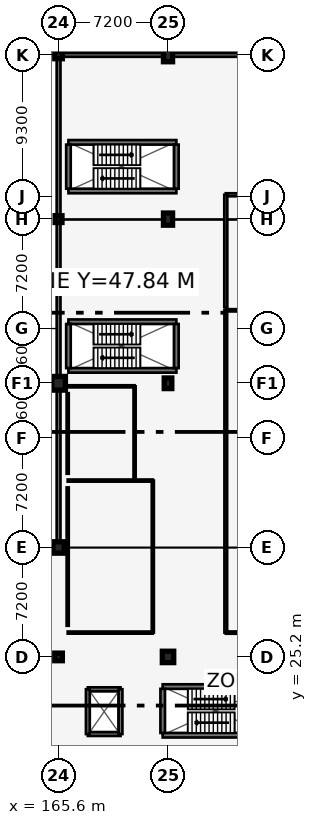
"""IFC4 building model, lengths in metres.
Left out: names, types, materials, properties, quantities, classifications, styles, units other than length and angle.
Written with IfcOpenShell. Run it as: python <this file> out.ifc"""

import sys

from ifc_helpers import new_model, si_unit, direction, frame, frame_2d, origin, origin_2d, place, context, subcontext, project, spatial, rectangle, circle, extrude, element, fill, save


model = new_model("IFC4")
c1 = context("Model", 3, precision=1e-05, world=origin(), true_north=direction((0.0, 1.0)))
c2 = subcontext(c1, "Body", "Model", "MODEL_VIEW")
j1 = project(units=[si_unit("LENGTHUNIT", "METRE"), si_unit("PLANEANGLEUNIT", "RADIAN")], contexts=[c1])
p1 = place(None, origin())
s1 = spatial("IfcSite", under=j1, at=p1, CompositionType="ELEMENT")
p2 = place(p1, origin())
s2 = spatial("IfcBuilding", under=s1, at=p2, CompositionType="ELEMENT")
p3 = place(p2, frame((0.0, 0.0, 13.2)))
s3 = spatial("IfcBuildingStorey", under=s2, at=p3, CompositionType="ELEMENT", Elevation=13.2)
p4 = place(p3, frame((165.6, 25.2, 0.0), z_axis=(0.0, 0.0, 1.0), x_axis=(1.0, 0.0, 0.0)))
e1 = element("IfcColumn", 1, at=p4, inside=s3, PredefinedType="COLUMN", context=c2, shape_type="SweptSolid", body=[
    extrude(circle(Radius=0.25, at=origin_2d()), origin(), (0.0, 0.0, 1.0), 4.2),
])
p5 = place(p3, frame((165.6, 32.4, 0.0), z_axis=(0.0, 0.0, 1.0), x_axis=(1.0, 0.0, 0.0)))
e2 = element("IfcColumn", 2, at=p5, inside=s3, PredefinedType="COLUMN", context=c2, shape_type="SweptSolid", body=[
    extrude(circle(Radius=0.375, at=origin_2d()), origin(), (0.0, 0.0, 1.0), 4.2),
])
p6 = place(p3, frame((165.6, 43.2, 0.0), z_axis=(0.0, 0.0, 1.0), x_axis=(1.0, 0.0, 0.0)))
e3 = element("IfcColumn", 3, at=p6, inside=s3, PredefinedType="COLUMN", context=c2, shape_type="SweptSolid", body=[
    extrude(circle(Radius=0.45, at=origin_2d()), origin(), (0.0, 0.0, 1.0), 4.2),
])
p7 = place(p3, frame((165.6, 54.0, 0.0), z_axis=(0.0, 0.0, 1.0), x_axis=(1.0, 0.0, 0.0)))
e4 = element("IfcColumn", 4, at=p7, inside=s3, PredefinedType="COLUMN", context=c2, shape_type="SweptSolid", body=[
    extrude(rectangle(XDim=0.45, YDim=0.45, at=origin_2d()), origin(), (0.0, 0.0, 1.0), 4.2),
])
p8 = place(p3, frame((165.6, 64.8, 0.0), z_axis=(0.0, 0.0, 1.0), x_axis=(1.0, 0.0, 0.0)))
e5 = element("IfcColumn", 5, at=p8, inside=s3, PredefinedType="COLUMN", context=c2, shape_type="SweptSolid", body=[
    extrude(rectangle(XDim=0.5, YDim=0.5, at=origin_2d()), origin(), (0.0, 0.0, 1.0), 4.2),
])
p9 = place(p3, frame((172.8, 25.2, 0.0), z_axis=(0.0, 0.0, 1.0), x_axis=(1.0, 0.0, 0.0)))
e6 = element("IfcColumn", 6, at=p9, inside=s3, PredefinedType="COLUMN", context=c2, shape_type="SweptSolid", body=[
    extrude(rectangle(XDim=0.75, YDim=0.75, at=origin_2d()), origin(), (0.0, 0.0, 1.0), 4.2),
])
p10 = place(p3, frame((172.8, 43.2, 0.0), z_axis=(0.0, 0.0, 1.0), x_axis=(1.0, 0.0, 0.0)))
e7 = element("IfcColumn", 7, at=p10, inside=s3, PredefinedType="COLUMN", context=c2, shape_type="SweptSolid", body=[
    extrude(rectangle(XDim=0.5, YDim=0.7, at=origin_2d()), origin(), (0.0, 0.0, 1.0), 4.2),
])
p11 = place(p3, frame((172.8, 54.0, 0.0), z_axis=(0.0, 0.0, 1.0), x_axis=(1.0, 0.0, 0.0)))
e8 = element("IfcColumn", 8, at=p11, inside=s3, PredefinedType="COLUMN", context=c2, shape_type="SweptSolid", body=[
    extrude(rectangle(XDim=0.6, YDim=0.8, at=origin_2d()), origin(), (0.0, 0.0, 1.0), 4.2),
])
p12 = place(p3, frame((172.8, 64.8, 0.0), z_axis=(0.0, 0.0, 1.0), x_axis=(1.0, 0.0, 0.0)))
e9 = element("IfcColumn", 9, at=p12, inside=s3, PredefinedType="COLUMN", context=c2, shape_type="SweptSolid", body=[
    extrude(rectangle(XDim=0.6, YDim=0.9, at=origin_2d()), origin(), (0.0, 0.0, 1.0), 4.2),
])
p13 = place(p3, frame((165.6, 32.4, 0.0), z_axis=(0.0, 0.0, 1.0), x_axis=(-1.0, 0.0, 0.0)))
e10 = element("IfcWall", 10, at=p13, inside=s3, PredefinedType="SOLIDWALL", context=c2, shape_type="SweptSolid", body=[
    extrude(rectangle(XDim=50.4, YDim=0.25, at=frame_2d((25.2, 0.0))), origin(), (0.0, 0.0, 1.0), 3.35),
])
p14 = place(p13, frame((2.2, 0.0, 0.78)))
e11 = element("IfcOpeningElement", 11, at=p14, cuts=e10, PredefinedType="OPENING", context=c2, shape_type="SweptSolid", body=[
    extrude(rectangle(XDim=1.35, YDim=1.75, at=frame_2d((0.675, 0.875))), frame((0.0, 0.135, 0.0), z_axis=(0.0, -1.0, 0.0), x_axis=(1.0, 0.0, 0.0)), (0.0, 0.0, 1.0), 0.27),
])
p15 = place(p13, frame((9.4, 0.0, 0.78)))
e12 = element("IfcOpeningElement", 12, at=p15, cuts=e10, PredefinedType="OPENING", context=c2, shape_type="SweptSolid", body=[
    extrude(rectangle(XDim=1.5, YDim=1.75, at=frame_2d((0.75, 0.875))), frame((0.0, 0.135, 0.0), z_axis=(0.0, -1.0, 0.0), x_axis=(1.0, 0.0, 0.0)), (0.0, 0.0, 1.0), 0.27),
])
p16 = place(p13, frame((16.6, 0.0, 0.78)))
e13 = element("IfcOpeningElement", 13, at=p16, cuts=e10, PredefinedType="OPENING", context=c2, shape_type="SweptSolid", body=[
    extrude(rectangle(XDim=1.65, YDim=1.8, at=frame_2d((0.825, 0.9))), frame((0.0, 0.135, 0.0), z_axis=(0.0, -1.0, 0.0), x_axis=(1.0, 0.0, 0.0)), (0.0, 0.0, 1.0), 0.27),
])
p17 = place(p13, frame((23.8, 0.0, 0.78)))
e14 = element("IfcOpeningElement", 14, at=p17, cuts=e10, PredefinedType="OPENING", context=c2, shape_type="SweptSolid", body=[
    extrude(rectangle(XDim=1.95, YDim=1.8, at=frame_2d((0.975, 0.9))), frame((0.0, 0.135, 0.0), z_axis=(0.0, -1.0, 0.0), x_axis=(1.0, 0.0, 0.0)), (0.0, 0.0, 1.0), 0.27),
])
p18 = place(p13, frame((31.0, 0.0, 0.78)))
e15 = element("IfcOpeningElement", 15, at=p18, cuts=e10, PredefinedType="OPENING", context=c2, shape_type="SweptSolid", body=[
    extrude(rectangle(XDim=2.1, YDim=1.8, at=frame_2d((1.05, 0.9))), frame((0.0, 0.135, 0.0), z_axis=(0.0, -1.0, 0.0), x_axis=(1.0, 0.0, 0.0)), (0.0, 0.0, 1.0), 0.27),
])
p19 = place(p13, frame((38.2, 0.0, 0.78)))
e16 = element("IfcOpeningElement", 16, at=p19, cuts=e10, PredefinedType="OPENING", context=c2, shape_type="SweptSolid", body=[
    extrude(rectangle(XDim=1.1, YDim=1.65, at=frame_2d((0.55, 0.825))), frame((0.0, 0.135, 0.0), z_axis=(0.0, -1.0, 0.0), x_axis=(1.0, 0.0, 0.0)), (0.0, 0.0, 1.0), 0.27),
])
p20 = place(p3, frame((187.2, 64.8, 0.0), z_axis=(0.0, 0.0, 1.0), x_axis=(-1.0, 0.0, 0.0)))
e17 = element("IfcWall", 17, at=p20, inside=s3, PredefinedType="SOLIDWALL", context=c2, shape_type="SweptSolid", body=[
    extrude(rectangle(XDim=21.6, YDim=0.25, at=frame_2d((10.8, 0.0))), origin(), (0.0, 0.0, 1.0), 3.35),
])
p21 = place(p20, frame((2.2, 0.0, 0.78)))
e18 = element("IfcOpeningElement", 18, at=p21, cuts=e17, PredefinedType="OPENING", context=c2, shape_type="SweptSolid", body=[
    extrude(rectangle(XDim=1.65, YDim=1.8, at=frame_2d((0.825, 0.9))), frame((0.0, 0.135, 0.0), z_axis=(0.0, -1.0, 0.0), x_axis=(1.0, 0.0, 0.0)), (0.0, 0.0, 1.0), 0.27),
])
p22 = place(p20, frame((9.4, 0.0, 0.78)))
e19 = element("IfcOpeningElement", 19, at=p22, cuts=e17, PredefinedType="OPENING", context=c2, shape_type="SweptSolid", body=[
    extrude(rectangle(XDim=1.95, YDim=1.8, at=frame_2d((0.975, 0.9))), frame((0.0, 0.135, 0.0), z_axis=(0.0, -1.0, 0.0), x_axis=(1.0, 0.0, 0.0)), (0.0, 0.0, 1.0), 0.27),
])
p23 = place(p3, frame((165.6, 64.8, 0.0), z_axis=(0.0, 0.0, 1.0), x_axis=(0.0, -1.0, 0.0)))
e20 = element("IfcWall", 20, at=p23, inside=s3, PredefinedType="SOLIDWALL", context=c2, shape_type="SweptSolid", body=[
    extrude(rectangle(XDim=32.4, YDim=0.25, at=frame_2d((16.2, 0.0))), origin(), (0.0, 0.0, 1.0), 3.35),
])
p24 = place(p23, frame((2.2, 0.0, 0.78)))
e21 = element("IfcOpeningElement", 21, at=p24, cuts=e20, PredefinedType="OPENING", context=c2, shape_type="SweptSolid", body=[
    extrude(rectangle(XDim=1.95, YDim=1.8, at=frame_2d((0.975, 0.9))), frame((0.0, 0.135, 0.0), z_axis=(0.0, -1.0, 0.0), x_axis=(1.0, 0.0, 0.0)), (0.0, 0.0, 1.0), 0.27),
])
p25 = place(p23, frame((16.6, 0.0, 0.78)))
e22 = element("IfcOpeningElement", 22, at=p25, cuts=e20, PredefinedType="OPENING", context=c2, shape_type="SweptSolid", body=[
    extrude(rectangle(XDim=1.1, YDim=1.65, at=frame_2d((0.55, 0.825))), frame((0.0, 0.135, 0.0), z_axis=(0.0, -1.0, 0.0), x_axis=(1.0, 0.0, 0.0)), (0.0, 0.0, 1.0), 0.27),
])
p26 = place(p3, frame((172.45, 20.05, 0.0), z_axis=(0.0, 0.0, 1.0), x_axis=(1.0, 0.0, 0.0)))
e23 = element("IfcWall", 23, at=p26, inside=s3, PredefinedType="SHEAR", context=c2, shape_type="SweptSolid", body=[
    extrude(rectangle(XDim=7.1, YDim=0.3, at=frame_2d((3.55, 0.0))), origin(), (0.0, 0.0, 1.0), 3.45),
])
p27 = place(p26, frame((0.35, 0.0, 0.0)))
e24 = element("IfcOpeningElement", 24, at=p27, cuts=e23, PredefinedType="OPENING", context=c2, shape_type="SweptSolid", body=[
    extrude(rectangle(XDim=1.07, YDim=2.15, at=frame_2d((0.535, 1.075))), frame((0.0, 0.16, 0.0), z_axis=(0.0, -1.0, 0.0), x_axis=(1.0, 0.0, 0.0)), (0.0, 0.0, 1.0), 0.32),
])
p28 = place(p3, frame((179.55, 23.25, 0.0), z_axis=(0.0, 0.0, 1.0), x_axis=(-1.0, 0.0, 0.0)))
e25 = element("IfcWall", 25, at=p28, inside=s3, PredefinedType="SHEAR", context=c2, shape_type="SweptSolid", body=[
    extrude(rectangle(XDim=7.1, YDim=0.3, at=frame_2d((3.55, 0.0))), origin(), (0.0, 0.0, 1.0), 3.45),
])
p29 = place(p3, frame((172.45, 23.1, 0.0), z_axis=(0.0, 0.0, 1.0), x_axis=(0.0, -1.0, 0.0)))
e26 = element("IfcWall", 26, at=p29, inside=s3, PredefinedType="SHEAR", context=c2, shape_type="SweptSolid", body=[
    extrude(rectangle(XDim=2.9, YDim=0.3, at=frame_2d((1.45, 0.0))), origin(), (0.0, 0.0, 1.0), 3.45),
])
for number, where, z_axis, x_axis in (
    (27, (166.25, 44.05, 0.0), (0.0, 0.0, 1.0), (1.0, 0.0, 0.0)),
    (28, (173.35, 47.25, 0.0), (0.0, 0.0, 1.0), (-1.0, 0.0, 0.0)),
):
    element("IfcWall", number, at=place(p3, frame(where, z_axis=z_axis, x_axis=x_axis)), inside=s3, PredefinedType="SHEAR", context=c2, shape_type="SweptSolid", body=[
        extrude(rectangle(XDim=7.1, YDim=0.3, at=frame_2d((3.55, 0.0))), origin(), (0.0, 0.0, 1.0), 3.45),
    ])
p30 = place(p3, frame((173.35, 44.2, 0.0), z_axis=(0.0, 0.0, 1.0), x_axis=(0.0, 1.0, 0.0)))
e29 = element("IfcWall", 29, at=p30, inside=s3, PredefinedType="SHEAR", context=c2, shape_type="SweptSolid", body=[
    extrude(rectangle(XDim=2.9, YDim=0.3, at=frame_2d((1.45, 0.0))), origin(), (0.0, 0.0, 1.0), 3.45),
])
p31 = place(p3, frame((166.25, 47.1, 0.0), z_axis=(0.0, 0.0, 1.0), x_axis=(0.0, -1.0, 0.0)))
e30 = element("IfcWall", 30, at=p31, inside=s3, PredefinedType="SHEAR", context=c2, shape_type="SweptSolid", body=[
    extrude(rectangle(XDim=2.9, YDim=0.3, at=frame_2d((1.45, 0.0))), origin(), (0.0, 0.0, 1.0), 3.45),
])
p32 = place(p31, frame((0.75, 0.0, 0.0)))
e31 = element("IfcOpeningElement", 31, at=p32, cuts=e30, PredefinedType="OPENING", context=c2, shape_type="SweptSolid", body=[
    extrude(rectangle(XDim=1.07, YDim=2.15, at=frame_2d((0.535, 1.075))), frame((0.0, 0.16, 0.0), z_axis=(0.0, -1.0, 0.0), x_axis=(1.0, 0.0, 0.0)), (0.0, 0.0, 1.0), 0.32),
])
for number, where, z_axis, x_axis in (
    (32, (166.25, 55.85, 0.0), (0.0, 0.0, 1.0), (1.0, 0.0, 0.0)),
    (33, (173.35, 59.05, 0.0), (0.0, 0.0, 1.0), (-1.0, 0.0, 0.0)),
):
    element("IfcWall", number, at=place(p3, frame(where, z_axis=z_axis, x_axis=x_axis)), inside=s3, PredefinedType="SHEAR", context=c2, shape_type="SweptSolid", body=[
        extrude(rectangle(XDim=7.1, YDim=0.3, at=frame_2d((3.55, 0.0))), origin(), (0.0, 0.0, 1.0), 3.45),
    ])
p33 = place(p3, frame((173.35, 56.0, 0.0), z_axis=(0.0, 0.0, 1.0), x_axis=(0.0, 1.0, 0.0)))
e34 = element("IfcWall", 34, at=p33, inside=s3, PredefinedType="SHEAR", context=c2, shape_type="SweptSolid", body=[
    extrude(rectangle(XDim=2.9, YDim=0.3, at=frame_2d((1.45, 0.0))), origin(), (0.0, 0.0, 1.0), 3.45),
])
p34 = place(p3, frame((166.25, 58.9, 0.0), z_axis=(0.0, 0.0, 1.0), x_axis=(0.0, -1.0, 0.0)))
e35 = element("IfcWall", 35, at=p34, inside=s3, PredefinedType="SHEAR", context=c2, shape_type="SweptSolid", body=[
    extrude(rectangle(XDim=2.9, YDim=0.3, at=frame_2d((1.45, 0.0))), origin(), (0.0, 0.0, 1.0), 3.45),
])
p35 = place(p34, frame((0.75, 0.0, 0.0)))
e36 = element("IfcOpeningElement", 36, at=p35, cuts=e35, PredefinedType="OPENING", context=c2, shape_type="SweptSolid", body=[
    extrude(rectangle(XDim=1.07, YDim=2.15, at=frame_2d((0.535, 1.075))), frame((0.0, 0.16, 0.0), z_axis=(0.0, -1.0, 0.0), x_axis=(1.0, 0.0, 0.0)), (0.0, 0.0, 1.0), 0.32),
])
p36 = place(p3, frame((167.525, 20.125, 0.0), z_axis=(0.0, 0.0, 1.0), x_axis=(1.0, 0.0, 0.0)))
e37 = element("IfcWall", 37, at=p36, inside=s3, PredefinedType="SHEAR", context=c2, shape_type="SweptSolid", body=[
    extrude(rectangle(XDim=2.15, YDim=0.25, at=frame_2d((1.075, 0.0))), origin(), (0.0, 0.0, 1.0), 3.55),
])
p37 = place(p3, frame((169.675, 23.075, 0.0), z_axis=(0.0, 0.0, 1.0), x_axis=(-1.0, 0.0, 0.0)))
e38 = element("IfcWall", 38, at=p37, inside=s3, PredefinedType="SHEAR", context=c2, shape_type="SweptSolid", body=[
    extrude(rectangle(XDim=2.15, YDim=0.25, at=frame_2d((1.075, 0.0))), origin(), (0.0, 0.0, 1.0), 3.55),
])
p38 = place(p37, frame((0.525, 0.0, 0.0)))
e39 = element("IfcOpeningElement", 39, at=p38, cuts=e38, PredefinedType="OPENING", context=c2, shape_type="SweptSolid", body=[
    extrude(rectangle(XDim=1.1, YDim=2.15, at=frame_2d((0.55, 1.075))), frame((0.0, 0.135, 0.0), z_axis=(0.0, -1.0, 0.0), x_axis=(1.0, 0.0, 0.0)), (0.0, 0.0, 1.0), 0.27),
])
for number, where, z_axis, x_axis in (
    (40, (167.525, 23.075, 0.0), (0.0, 0.0, 1.0), (0.0, -1.0, 0.0)),
    (41, (169.675, 20.125, 0.0), (0.0, 0.0, 1.0), (0.0, 1.0, 0.0)),
):
    element("IfcWall", number, at=place(p3, frame(where, z_axis=z_axis, x_axis=x_axis)), inside=s3, PredefinedType="SHEAR", context=c2, shape_type="SweptSolid", body=[
        extrude(rectangle(XDim=2.95, YDim=0.25, at=frame_2d((1.475, 0.0))), origin(), (0.0, 0.0, 1.0), 3.55),
    ])
p39 = place(p3, frame((176.6, 48.0, 0.0), z_axis=(0.0, 0.0, 1.0), x_axis=(1.0, 0.0, 0.0)))
e42 = element("IfcWall", 42, at=p39, inside=s3, PredefinedType="PARTITIONING", context=c2, shape_type="SweptSolid", body=[
    extrude(rectangle(XDim=9.8, YDim=0.15, at=frame_2d((4.9, 0.0))), origin(), (0.0, 0.0, 1.0), 3.6),
])
p40 = place(p3, frame((186.4, 26.8, 0.0), z_axis=(0.0, 0.0, 1.0), x_axis=(-1.0, 0.0, 0.0)))
e43 = element("IfcWall", 43, at=p40, inside=s3, PredefinedType="PARTITIONING", context=c2, shape_type="SweptSolid", body=[
    extrude(rectangle(XDim=9.8, YDim=0.15, at=frame_2d((4.9, 0.0))), origin(), (0.0, 0.0, 1.0), 3.38),
])
p41 = place(p3, frame((176.6, 48.0, 0.0), z_axis=(0.0, 0.0, 1.0), x_axis=(0.0, -1.0, 0.0)))
e44 = element("IfcWall", 44, at=p41, inside=s3, PredefinedType="SOLIDWALL", context=c2, shape_type="SweptSolid", body=[
    extrude(rectangle(XDim=21.2, YDim=0.18, at=frame_2d((10.6, 0.0))), origin(), (0.0, 0.0, 1.0), 3.175),
])
p42 = place(p41, frame((10.1, 0.0, 0.0)))
e45 = element("IfcOpeningElement", 45, at=p42, cuts=e44, PredefinedType="OPENING", context=c2, shape_type="SweptSolid", body=[
    extrude(rectangle(XDim=1.0, YDim=2.15, at=frame_2d((0.5, 1.075))), frame((0.0, 0.1, 0.0), z_axis=(0.0, -1.0, 0.0), x_axis=(1.0, 0.0, 0.0)), (0.0, 0.0, 1.0), 0.2),
])
p43 = place(p3, frame((176.6, 55.6, 0.0), z_axis=(0.0, 0.0, 1.0), x_axis=(1.0, 0.0, 0.0)))
e46 = element("IfcWall", 46, at=p43, inside=s3, PredefinedType="SOLIDWALL", context=c2, shape_type="SweptSolid", body=[
    extrude(rectangle(XDim=9.8, YDim=0.2, at=frame_2d((4.9, 0.0))), origin(), (0.0, 0.0, 1.0), 3.6),
])
p44 = place(p3, frame((176.6, 55.6, 0.0), z_axis=(0.0, 0.0, 1.0), x_axis=(0.0, -1.0, 0.0)))
e47 = element("IfcWall", 47, at=p44, inside=s3, PredefinedType="SOLIDWALL", context=c2, shape_type="SweptSolid", body=[
    extrude(rectangle(XDim=7.4, YDim=0.2, at=frame_2d((3.7, 0.0))), origin(), (0.0, 0.0, 1.0), 3.482),
])
p45 = place(p44, frame((2.8, 0.0, 0.0)))
e48 = element("IfcOpeningElement", 48, at=p45, cuts=e47, PredefinedType="OPENING", context=c2, shape_type="SweptSolid", body=[
    extrude(rectangle(XDim=1.8, YDim=2.2, at=frame_2d((0.9, 1.1))), frame((0.0, 0.11, 0.0), z_axis=(0.0, -1.0, 0.0), x_axis=(1.0, 0.0, 0.0)), (0.0, 0.0, 1.0), 0.22),
])
for number, where, z_axis, x_axis in (
    (49, (166.2, 36.8, 0.0), (0.0, 0.0, 1.0), (1.0, 0.0, 0.0)),
    (50, (171.8, 26.8, 0.0), (0.0, 0.0, 1.0), (-1.0, 0.0, 0.0)),
):
    element("IfcWall", number, at=place(p3, frame(where, z_axis=z_axis, x_axis=x_axis)), inside=s3, PredefinedType="PARTITIONING", context=c2, shape_type="SweptSolid", body=[
        extrude(rectangle(XDim=5.6, YDim=0.14, at=frame_2d((2.8, 0.0))), origin(), (0.0, 0.0, 1.0), 3.5),
    ])
p46 = place(p3, frame((166.2, 36.35, 0.0), z_axis=(0.0, 0.0, 1.0), x_axis=(0.0, -1.0, 0.0)))
e51 = element("IfcWall", 51, at=p46, inside=s3, PredefinedType="PARTITIONING", context=c2, shape_type="SweptSolid", body=[
    extrude(rectangle(XDim=9.1, YDim=0.14, at=frame_2d((4.55, 0.0))), origin(), (0.0, 0.0, 1.0), 3.5),
])
p47 = place(p3, frame((171.8, 26.8, 0.0), z_axis=(0.0, 0.0, 1.0), x_axis=(0.0, 1.0, 0.0)))
e52 = element("IfcWall", 52, at=p47, inside=s3, PredefinedType="PARTITIONING", context=c2, shape_type="SweptSolid", body=[
    extrude(rectangle(XDim=10.0, YDim=0.14, at=frame_2d((5.0, 0.0))), origin(), (0.0, 0.0, 1.0), 3.5),
])
p48 = place(p47, frame((4.51, 0.0, 0.0)))
e53 = element("IfcOpeningElement", 53, at=p48, cuts=e52, PredefinedType="OPENING", context=c2, shape_type="SweptSolid", body=[
    extrude(rectangle(XDim=0.98, YDim=2.15, at=frame_2d((0.49, 1.075))), frame((0.0, 0.08, 0.0), z_axis=(0.0, -1.0, 0.0), x_axis=(1.0, 0.0, 0.0)), (0.0, 0.0, 1.0), 0.16),
])
p49 = place(p3, frame((166.2, 43.0, 0.0), z_axis=(0.0, 0.0, 1.0), x_axis=(1.0, 0.0, 0.0)))
e54 = element("IfcWall", 54, at=p49, inside=s3, PredefinedType="PARTITIONING", context=c2, shape_type="SweptSolid", body=[
    extrude(rectangle(XDim=4.4, YDim=0.14, at=frame_2d((2.2, 0.0))), origin(), (0.0, 0.0, 1.0), 3.175),
])
p50 = place(p3, frame((166.2, 42.55, 0.0), z_axis=(0.0, 0.0, 1.0), x_axis=(0.0, -1.0, 0.0)))
e55 = element("IfcWall", 55, at=p50, inside=s3, PredefinedType="PARTITIONING", context=c2, shape_type="SweptSolid", body=[
    extrude(rectangle(XDim=5.3, YDim=0.14, at=frame_2d((2.65, 0.0))), origin(), (0.0, 0.0, 1.0), 3.5),
])
p51 = place(p3, frame((170.6, 37.0, 0.0), z_axis=(0.0, 0.0, 1.0), x_axis=(0.0, 1.0, 0.0)))
e56 = element("IfcWall", 56, at=p51, inside=s3, PredefinedType="PARTITIONING", context=c2, shape_type="SweptSolid", body=[
    extrude(rectangle(XDim=6.0, YDim=0.14, at=frame_2d((3.0, 0.0))), origin(), (0.0, 0.0, 1.0), 3.5),
])
p52 = place(p51, frame((2.505, 0.0, 0.0)))
e57 = element("IfcOpeningElement", 57, at=p52, cuts=e56, PredefinedType="OPENING", context=c2, shape_type="SweptSolid", body=[
    extrude(rectangle(XDim=0.99, YDim=2.15, at=frame_2d((0.495, 1.075))), frame((0.0, 0.08, 0.0), z_axis=(0.0, -1.0, 0.0), x_axis=(1.0, 0.0, 0.0)), (0.0, 0.0, 1.0), 0.16),
])
p53 = place(p22, origin())
e58 = element("IfcWindow", 58, at=p53, inside=s3, PartitioningType="SINGLE_PANEL", PredefinedType="WINDOW", context=c2, shape_type="SweptSolid", body=[
    extrude(rectangle(XDim=1.95, YDim=1.8, at=frame_2d((0.975, 0.9))), frame((0.0, 0.03, 0.0), z_axis=(0.0, -1.0, 0.0), x_axis=(1.0, 0.0, 0.0)), (0.0, 0.0, 1.0), 0.06),
])
fill(e19, e58)
p54 = place(p24, origin())
e59 = element("IfcWindow", 59, at=p54, inside=s3, PartitioningType="SINGLE_PANEL", PredefinedType="WINDOW", context=c2, shape_type="SweptSolid", body=[
    extrude(rectangle(XDim=1.95, YDim=1.8, at=frame_2d((0.975, 0.9))), frame((0.0, 0.03, 0.0), z_axis=(0.0, -1.0, 0.0), x_axis=(1.0, 0.0, 0.0)), (0.0, 0.0, 1.0), 0.06),
])
fill(e21, e59)
p55 = place(p25, origin())
e60 = element("IfcWindow", 60, at=p55, inside=s3, PartitioningType="SINGLE_PANEL", PredefinedType="WINDOW", context=c2, shape_type="SweptSolid", body=[
    extrude(rectangle(XDim=1.1, YDim=1.65, at=frame_2d((0.55, 0.825))), frame((0.0, 0.03, 0.0), z_axis=(0.0, -1.0, 0.0), x_axis=(1.0, 0.0, 0.0)), (0.0, 0.0, 1.0), 0.06),
])
fill(e22, e60)
p56 = place(p27, origin())
e61 = element("IfcDoor", 61, at=p56, inside=s3, OperationType="SINGLE_SWING_RIGHT", PredefinedType="DOOR", context=c2, shape_type="SweptSolid", body=[
    extrude(rectangle(XDim=1.07, YDim=2.15, at=frame_2d((0.535, 1.075))), frame((0.0, 0.025, 0.0), z_axis=(0.0, -1.0, 0.0), x_axis=(1.0, 0.0, 0.0)), (0.0, 0.0, 1.0), 0.05),
])
fill(e24, e61)
p57 = place(p32, origin())
e62 = element("IfcDoor", 62, at=p57, inside=s3, OperationType="SINGLE_SWING_RIGHT", PredefinedType="DOOR", context=c2, shape_type="SweptSolid", body=[
    extrude(rectangle(XDim=1.07, YDim=2.15, at=frame_2d((0.535, 1.075))), frame((0.0, 0.025, 0.0), z_axis=(0.0, -1.0, 0.0), x_axis=(1.0, 0.0, 0.0)), (0.0, 0.0, 1.0), 0.05),
])
fill(e31, e62)
p58 = place(p35, origin())
e63 = element("IfcDoor", 63, at=p58, inside=s3, OperationType="SINGLE_SWING_RIGHT", PredefinedType="DOOR", context=c2, shape_type="SweptSolid", body=[
    extrude(rectangle(XDim=1.07, YDim=2.15, at=frame_2d((0.535, 1.075))), frame((0.0, 0.025, 0.0), z_axis=(0.0, -1.0, 0.0), x_axis=(1.0, 0.0, 0.0)), (0.0, 0.0, 1.0), 0.05),
])
fill(e36, e63)
p59 = place(p38, origin())
e64 = element("IfcDoor", 64, at=p59, inside=s3, OperationType="SLIDING_TO_LEFT", PredefinedType="DOOR", context=c2, shape_type="SweptSolid", body=[
    extrude(rectangle(XDim=1.1, YDim=2.15, at=frame_2d((0.55, 1.075))), frame((0.0, 0.025, 0.0), z_axis=(0.0, -1.0, 0.0), x_axis=(1.0, 0.0, 0.0)), (0.0, 0.0, 1.0), 0.05),
])
fill(e39, e64)
p60 = place(p42, origin())
e65 = element("IfcDoor", 65, at=p60, inside=s3, OperationType="SINGLE_SWING_LEFT", PredefinedType="DOOR", context=c2, shape_type="SweptSolid", body=[
    extrude(rectangle(XDim=1.0, YDim=2.15, at=frame_2d((0.5, 1.075))), frame((0.0, 0.025, 0.0), z_axis=(0.0, -1.0, 0.0), x_axis=(1.0, 0.0, 0.0)), (0.0, 0.0, 1.0), 0.05),
])
fill(e45, e65)
p61 = place(p45, origin())
e66 = element("IfcDoor", 66, at=p61, inside=s3, OperationType="DOUBLE_SWING_LEFT", PredefinedType="DOOR", context=c2, shape_type="SweptSolid", body=[
    extrude(rectangle(XDim=1.8, YDim=2.2, at=frame_2d((0.9, 1.1))), frame((0.0, 0.025, 0.0), z_axis=(0.0, -1.0, 0.0), x_axis=(1.0, 0.0, 0.0)), (0.0, 0.0, 1.0), 0.05),
])
fill(e48, e66)
p62 = place(p48, origin())
e67 = element("IfcDoor", 67, at=p62, inside=s3, OperationType="SINGLE_SWING_LEFT", PredefinedType="DOOR", context=c2, shape_type="SweptSolid", body=[
    extrude(rectangle(XDim=0.98, YDim=2.15, at=frame_2d((0.49, 1.075))), frame((0.0, 0.025, 0.0), z_axis=(0.0, -1.0, 0.0), x_axis=(1.0, 0.0, 0.0)), (0.0, 0.0, 1.0), 0.05),
])
fill(e53, e67)
p63 = place(p52, origin())
e68 = element("IfcDoor", 68, at=p63, inside=s3, OperationType="SINGLE_SWING_RIGHT", PredefinedType="DOOR", context=c2, shape_type="SweptSolid", body=[
    extrude(rectangle(XDim=0.99, YDim=2.15, at=frame_2d((0.495, 1.075))), frame((0.0, 0.025, 0.0), z_axis=(0.0, -1.0, 0.0), x_axis=(1.0, 0.0, 0.0)), (0.0, 0.0, 1.0), 0.05),
])
fill(e57, e68)
save(model, sys.argv[1])
